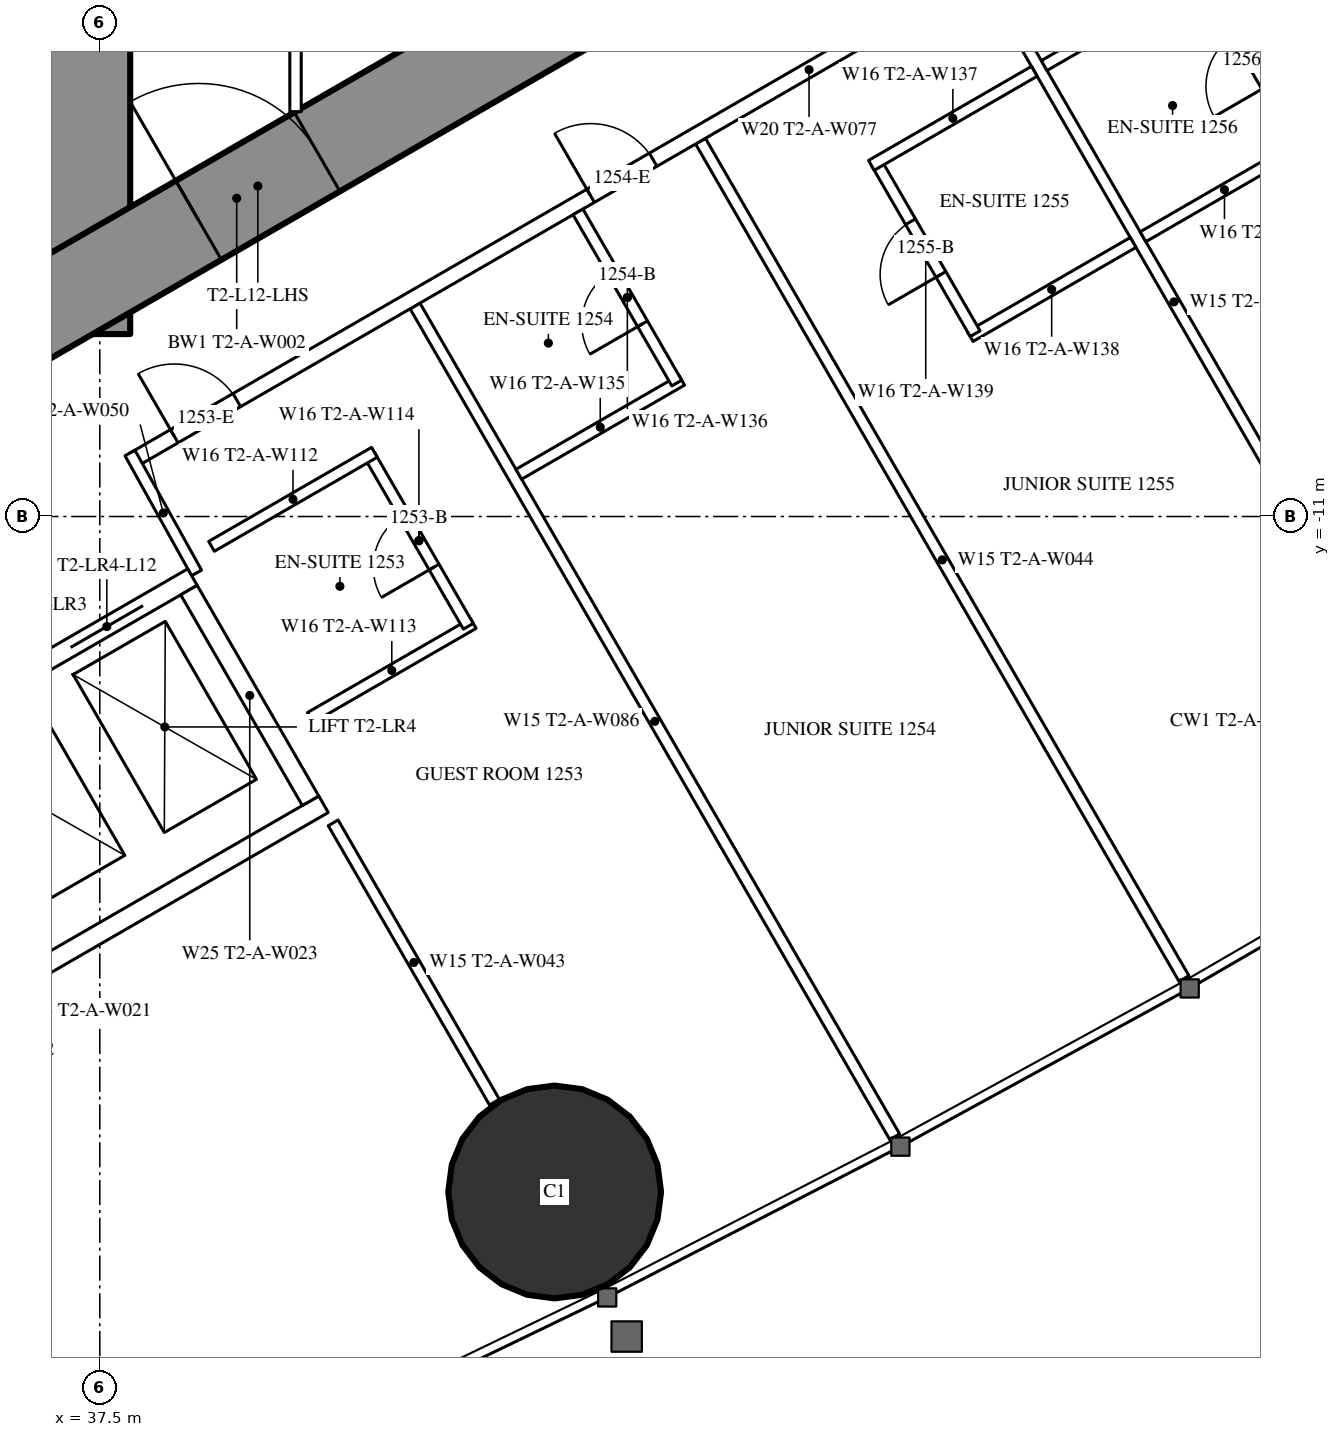
"""IFC4 building model, lengths in metres.
Left out: names, types, materials, properties, quantities, classifications, styles, units other than length and angle.
Written with IfcOpenShell. Run it as: python <this file> out.ifc"""

import sys

from ifc_helpers import new_model, si_unit, direction, frame, frame_2d, origin, origin_2d, place, context, subcontext, project, spatial, rectangle, hollow_circle, extrude, element, fill, save


model = new_model("IFC4")
c1 = context("Model", 3, precision=1e-05, world=origin(), true_north=direction((0.0, 1.0)))
c2 = subcontext(c1, "Body", "Model", "MODEL_VIEW")
j1 = project(units=[si_unit("LENGTHUNIT", "METRE"), si_unit("PLANEANGLEUNIT", "RADIAN")], contexts=[c1])
p1 = place(None, origin())
s1 = spatial("IfcSite", under=j1, at=p1, CompositionType="ELEMENT")
p2 = place(p1, origin())
s2 = spatial("IfcBuilding", under=s1, at=p2, CompositionType="ELEMENT")
p3 = place(p2, frame((0.0, 0.0, 49.5)))
s3 = spatial("IfcBuildingStorey", under=s2, at=p3, CompositionType="ELEMENT", Elevation=49.5)
p4 = place(p3, frame((43.484, -19.886, 0.0), z_axis=(0.0, 0.0, 1.0), x_axis=(1.0, 0.0, 0.0)))
e1 = element("IfcColumn", 1, at=p4, inside=s3, PredefinedType="COLUMN", context=c2, shape_type="SweptSolid", body=[
    extrude(hollow_circle(Radius=1.4, WallThickness=0.12, at=origin_2d()), origin(), (0.0, 0.0, 1.0), 3.5),
])
p5 = place(p3, frame((37.3, -8.6, 0.0), z_axis=(0.0, 0.0, 1.0), x_axis=(0.0, 1.0, 0.0)))
e2 = element("IfcWall", 2, at=p5, inside=s3, PredefinedType="SHEAR", context=c2, shape_type="SweptSolid", body=[
    extrude(rectangle(XDim=17.2, YDim=1.2, at=frame_2d((8.6, 0.0))), origin(), (0.0, 0.0, 1.0), 3.5),
])
p6 = place(p5, frame((7.7, 0.0, 0.0)))
e3 = element("IfcOpeningElement", 3, at=p6, cuts=e2, PredefinedType="OPENING", context=c2, shape_type="SweptSolid", body=[
    extrude(rectangle(XDim=1.8, YDim=2.2, at=frame_2d((0.9, 1.1))), frame((0.0, 0.61, 0.0), z_axis=(0.0, -1.0, 0.0), x_axis=(1.0, 0.0, 0.0)), (0.0, 0.0, 1.0), 1.22),
])
p7 = place(p3, frame((27.2, -13.8, 0.0), z_axis=(0.0, 0.0, 1.0), x_axis=(0.866027159892, 0.499996958321, 0.0)))
e4 = element("IfcWall", 4, at=p7, inside=s3, PredefinedType="SHEAR", context=c2, shape_type="SweptSolid", body=[
    extrude(rectangle(XDim=27.947, YDim=1.2, at=frame_2d((13.973, 0.0))), origin(), (0.0, 0.0, 1.0), 3.5),
])
p8 = place(p7, frame((4.6, 0.0, 0.0)))
e5 = element("IfcOpeningElement", 5, at=p8, cuts=e4, PredefinedType="OPENING", context=c2, shape_type="SweptSolid", body=[
    extrude(rectangle(XDim=1.0, YDim=2.2, at=frame_2d((0.5, 1.1))), frame((0.0, 0.61, 0.0), z_axis=(0.0, -1.0, 0.0), x_axis=(1.0, 0.0, 0.0)), (0.0, 0.0, 1.0), 1.22),
])
p9 = place(p7, frame((13.395, 0.0, 0.0)))
e6 = element("IfcOpeningElement", 6, at=p9, cuts=e4, PredefinedType="OPENING", context=c2, shape_type="SweptSolid", body=[
    extrude(rectangle(XDim=1.8, YDim=2.2, at=frame_2d((0.9, 1.1))), frame((0.0, 0.61, 0.0), z_axis=(0.0, -1.0, 0.0), x_axis=(1.0, 0.0, 0.0)), (0.0, 0.0, 1.0), 1.22),
])
p10 = place(p3, frame((41.647, -8.23, 0.0), z_axis=(0.0, 0.0, 1.0), x_axis=(0.49998590462, -0.866033541603, 0.0)))
e7 = element("IfcWall", 7, at=p10, inside=s3, PredefinedType="PARTITIONING", context=c2, shape_type="SweptSolid", body=[
    extrude(rectangle(XDim=12.621, YDim=0.15, at=frame_2d((6.311, 0.0))), origin(), (0.0, 0.0, 1.0), 3.25),
])
p11 = place(p3, frame((45.403, -6.062, 0.0), z_axis=(0.0, 0.0, 1.0), x_axis=(0.500007077968, -0.866021317279, 0.0)))
e8 = element("IfcWall", 8, at=p11, inside=s3, PredefinedType="PARTITIONING", context=c2, shape_type="SweptSolid", body=[
    extrude(rectangle(XDim=12.721, YDim=0.15, at=frame_2d((6.361, 0.0))), origin(), (0.0, 0.0, 1.0), 3.25),
])
p12 = place(p3, frame((49.159, -3.893, 0.0), z_axis=(0.0, 0.0, 1.0), x_axis=(0.499998773722, -0.866026111775, 0.0)))
e9 = element("IfcWall", 9, at=p12, inside=s3, PredefinedType="PARTITIONING", context=c2, shape_type="SweptSolid", body=[
    extrude(rectangle(XDim=9.892, YDim=0.15, at=frame_2d((4.946, 0.0))), origin(), (0.0, 0.0, 1.0), 2.25),
])
p13 = place(p3, frame((40.57, -15.03, 0.0), z_axis=(0.0, 0.0, 1.0), x_axis=(0.500012993597, -0.866017901798, 0.0)))
e10 = element("IfcWall", 10, at=p13, inside=s3, PredefinedType="PARTITIONING", context=c2, shape_type="SweptSolid", body=[
    extrude(rectangle(XDim=4.243, YDim=0.15, at=frame_2d((2.122, 0.0))), origin(), (0.0, 0.0, 1.0), 3.25),
])
p14 = place(p3, frame((37.96, -10.243, 0.0), z_axis=(0.0, 0.0, 1.0), x_axis=(0.866026429433, 0.499998223521, 0.0)))
e11 = element("IfcWall", 11, at=p14, inside=s3, PredefinedType="PARTITIONING", context=c2, shape_type="SweptSolid", body=[
    extrude(rectangle(XDim=20.487, YDim=0.2, at=frame_2d((10.243, 0.0))), origin(), (0.0, 0.0, 1.0), 3.25),
])
p15 = place(p14, frame((6.925, 0.0, 0.0)))
e12 = element("IfcOpeningElement", 12, at=p15, cuts=e11, PredefinedType="OPENING", context=c2, shape_type="SweptSolid", body=[
    extrude(rectangle(XDim=0.95, YDim=2.2, at=frame_2d((0.475, 1.1))), frame((0.0, 0.11, 0.0), z_axis=(0.0, -1.0, 0.0), x_axis=(1.0, 0.0, 0.0)), (0.0, 0.0, 1.0), 0.22),
])
p16 = place(p14, frame((11.549, 0.0, 0.0)))
e13 = element("IfcOpeningElement", 13, at=p16, cuts=e11, PredefinedType="OPENING", context=c2, shape_type="SweptSolid", body=[
    extrude(rectangle(XDim=0.95, YDim=2.2, at=frame_2d((0.475, 1.1))), frame((0.0, 0.11, 0.0), z_axis=(0.0, -1.0, 0.0), x_axis=(1.0, 0.0, 0.0)), (0.0, 0.0, 1.0), 0.22),
])
p17 = place(p14, frame((13.249, 0.0, 0.0)))
e14 = element("IfcOpeningElement", 14, at=p17, cuts=e11, PredefinedType="OPENING", context=c2, shape_type="SweptSolid", body=[
    extrude(rectangle(XDim=0.95, YDim=2.2, at=frame_2d((0.475, 1.1))), frame((0.0, 0.11, 0.0), z_axis=(0.0, -1.0, 0.0), x_axis=(1.0, 0.0, 0.0)), (0.0, 0.0, 1.0), 0.22),
])
p18 = place(p14, frame((17.585, 0.0, 0.0)))
e15 = element("IfcOpeningElement", 15, at=p18, cuts=e11, PredefinedType="OPENING", context=c2, shape_type="SweptSolid", body=[
    extrude(rectangle(XDim=0.95, YDim=2.2, at=frame_2d((0.475, 1.1))), frame((0.0, 0.11, 0.0), z_axis=(0.0, -1.0, 0.0), x_axis=(1.0, 0.0, 0.0)), (0.0, 0.0, 1.0), 0.22),
])
p19 = place(p14, frame((0.6, 0.0, 0.0)))
e16 = element("IfcOpeningElement", 16, at=p19, cuts=e11, PredefinedType="OPENING", context=c2, shape_type="SweptSolid", body=[
    extrude(rectangle(XDim=0.95, YDim=2.2, at=frame_2d((0.475, 1.1))), frame((0.0, 0.11, 0.0), z_axis=(0.0, -1.0, 0.0), x_axis=(1.0, 0.0, 0.0)), (0.0, 0.0, 1.0), 0.22),
])
p20 = place(p3, frame((38.773, -11.742, 0.0), z_axis=(0.0, 0.0, 1.0), x_axis=(-0.485528096672, 0.8742210632, 0.0)))
e17 = element("IfcWall", 17, at=p20, inside=s3, PredefinedType="PARTITIONING", context=c2, shape_type="SweptSolid", body=[
    extrude(rectangle(XDim=1.805, YDim=0.15, at=frame_2d((0.903, 0.0))), origin(), (0.0, 0.0, 1.0), 3.25),
])
p21 = place(p3, frame((43.012, -10.444, 0.0), z_axis=(0.0, 0.0, 1.0), x_axis=(0.866031185235, 0.4999899861, 0.0)))
e18 = element("IfcWall", 18, at=p21, inside=s3, PredefinedType="PARTITIONING", context=c2, shape_type="SweptSolid", body=[
    extrude(rectangle(XDim=2.475, YDim=0.15, at=frame_2d((1.238, 0.0))), origin(), (0.0, 0.0, 1.0), 3.25),
])
p22 = place(p3, frame((43.791, -6.993, 0.0), z_axis=(0.0, 0.0, 1.0), x_axis=(0.500047596559, -0.865997922154, 0.0)))
e19 = element("IfcWall", 19, at=p22, inside=s3, PredefinedType="PARTITIONING", context=c2, shape_type="SweptSolid", body=[
    extrude(rectangle(XDim=2.6, YDim=0.15, at=frame_2d((1.3, 0.0))), origin(), (0.0, 0.0, 1.0), 3.25),
])
p23 = place(p22, frame((0.9, 0.0, 0.0)))
e20 = element("IfcOpeningElement", 20, at=p23, cuts=e19, PredefinedType="OPENING", context=c2, shape_type="SweptSolid", body=[
    extrude(rectangle(XDim=0.8, YDim=2.2, at=frame_2d((0.4, 1.1))), frame((0.0, 0.085, 0.0), z_axis=(0.0, -1.0, 0.0), x_axis=(1.0, 0.0, 0.0)), (0.0, 0.0, 1.0), 0.17),
])
p24 = place(p3, frame((48.951, -8.632, 0.0), z_axis=(0.0, 0.0, 1.0), x_axis=(0.866006523861, 0.500032699561, 0.0)))
e21 = element("IfcWall", 21, at=p24, inside=s3, PredefinedType="PARTITIONING", context=c2, shape_type="SweptSolid", body=[
    extrude(rectangle(XDim=2.475, YDim=0.15, at=frame_2d((1.237, 0.0))), origin(), (0.0, 0.0, 1.0), 3.25),
])
p25 = place(p3, frame((47.716, -6.343, 0.0), z_axis=(0.0, 0.0, 1.0), x_axis=(0.500006934395, -0.866021400173, 0.0)))
e22 = element("IfcWall", 22, at=p25, inside=s3, PredefinedType="PARTITIONING", context=c2, shape_type="SweptSolid", body=[
    extrude(rectangle(XDim=2.6, YDim=0.15, at=frame_2d((1.3, 0.0))), origin(), (0.0, 0.0, 1.0), 3.25),
])
p26 = place(p25, frame((0.9, 0.0, 0.0)))
e23 = element("IfcOpeningElement", 23, at=p26, cuts=e22, PredefinedType="OPENING", context=c2, shape_type="SweptSolid", body=[
    extrude(rectangle(XDim=0.8, YDim=2.2, at=frame_2d((0.4, 1.1))), frame((0.0, 0.085, 0.0), z_axis=(0.0, -1.0, 0.0), x_axis=(1.0, 0.0, 0.0)), (0.0, 0.0, 1.0), 0.17),
])
for number, where, z_axis, x_axis in (
    (24, (47.651, -6.38, 0.0), (0.0, 0.0, 1.0), (0.866, 0.5, 0.0)),
    (25, (51.224, -7.32, 0.0), (0.0, 0.0, 1.0), (0.866, 0.5, 0.0)),
):
    element("IfcWall", number, at=place(p3, frame(where, z_axis=z_axis, x_axis=x_axis)), inside=s3, PredefinedType="PARTITIONING", context=c2, shape_type="SweptSolid", body=[
        extrude(rectangle(XDim=2.475, YDim=0.15, at=frame_2d((1.238, 0.0))), origin(), (0.0, 0.0, 1.0), 3.25),
    ])
p27 = place(p3, frame((52.003, -3.868, 0.0), z_axis=(0.0, 0.0, 1.0), x_axis=(0.500047596559, -0.865997922154, 0.0)))
e26 = element("IfcWall", 26, at=p27, inside=s3, PredefinedType="PARTITIONING", context=c2, shape_type="SweptSolid", body=[
    extrude(rectangle(XDim=2.6, YDim=0.15, at=frame_2d((1.3, 0.0))), origin(), (0.0, 0.0, 1.0), 3.25),
])
p28 = place(p27, frame((0.9, 0.0, 0.0)))
e27 = element("IfcOpeningElement", 27, at=p28, cuts=e26, PredefinedType="OPENING", context=c2, shape_type="SweptSolid", body=[
    extrude(rectangle(XDim=0.8, YDim=2.2, at=frame_2d((0.4, 1.1))), frame((0.0, 0.085, 0.0), z_axis=(0.0, -1.0, 0.0), x_axis=(1.0, 0.0, 0.0)), (0.0, 0.0, 1.0), 0.17),
])
p29 = place(p3, frame((49.925, -5.068, 0.0), z_axis=(0.0, 0.0, 1.0), x_axis=(0.866006523861, 0.500032699561, 0.0)))
e28 = element("IfcWall", 28, at=p29, inside=s3, PredefinedType="PARTITIONING", context=c2, shape_type="SweptSolid", body=[
    extrude(rectangle(XDim=2.475, YDim=0.15, at=frame_2d((1.237, 0.0))), origin(), (0.0, 0.0, 1.0), 3.25),
])
p30 = place(p3, frame((40.27, -13.644, 0.0), z_axis=(0.0, 0.0, 1.0), x_axis=(0.866031185235, 0.4999899861, 0.0)))
e29 = element("IfcWall", 29, at=p30, inside=s3, PredefinedType="PARTITIONING", context=c2, shape_type="SweptSolid", body=[
    extrude(rectangle(XDim=2.475, YDim=0.15, at=frame_2d((1.238, 0.0))), origin(), (0.0, 0.0, 1.0), 3.25),
])
p31 = place(p3, frame((41.048, -10.193, 0.0), z_axis=(0.0, 0.0, 1.0), x_axis=(0.500047596559, -0.865997922154, 0.0)))
e30 = element("IfcWall", 30, at=p31, inside=s3, PredefinedType="PARTITIONING", context=c2, shape_type="SweptSolid", body=[
    extrude(rectangle(XDim=2.6, YDim=0.15, at=frame_2d((1.3, 0.0))), origin(), (0.0, 0.0, 1.0), 3.25),
])
p32 = place(p31, frame((0.9, 0.0, 0.0)))
e31 = element("IfcOpeningElement", 31, at=p32, cuts=e30, PredefinedType="OPENING", context=c2, shape_type="SweptSolid", body=[
    extrude(rectangle(XDim=0.8, YDim=2.2, at=frame_2d((0.4, 1.1))), frame((0.0, 0.085, 0.0), z_axis=(0.0, -1.0, 0.0), x_axis=(1.0, 0.0, 0.0)), (0.0, 0.0, 1.0), 0.17),
])
p33 = place(p3, frame((38.97, -11.393, 0.0), z_axis=(0.0, 0.0, 1.0), x_axis=(0.866031185235, 0.4999899861, 0.0)))
e32 = element("IfcWall", 32, at=p33, inside=s3, PredefinedType="PARTITIONING", context=c2, shape_type="SweptSolid", body=[
    extrude(rectangle(XDim=2.475, YDim=0.15, at=frame_2d((1.238, 0.0))), origin(), (0.0, 0.0, 1.0), 3.25),
])
p34 = place(p3, frame((40.075, -5.674, 0.0), z_axis=(0.0, 0.0, 1.0), x_axis=(0.0, 1.0, 0.0)))
e33 = element("IfcWall", 33, at=p34, inside=s3, PredefinedType="PARTITIONING", context=c2, shape_type="SweptSolid", body=[
    extrude(rectangle(XDim=6.874, YDim=0.15, at=frame_2d((3.437, 0.0))), origin(), (0.0, 0.0, 1.0), 3.25),
])
p35 = place(p34, frame((2.537, 0.0, 0.0)))
e34 = element("IfcOpeningElement", 34, at=p35, cuts=e33, PredefinedType="OPENING", context=c2, shape_type="SweptSolid", body=[
    extrude(rectangle(XDim=1.8, YDim=2.2, at=frame_2d((0.9, 1.1))), frame((0.0, 0.085, 0.0), z_axis=(0.0, -1.0, 0.0), x_axis=(1.0, 0.0, 0.0)), (0.0, 0.0, 1.0), 0.17),
])
p36 = place(p3, frame((31.271, -16.097, 0.0), z_axis=(0.0, 0.0, 1.0), x_axis=(0.86604045752, 0.499973925258, 0.0)))
e35 = element("IfcWall", 35, at=p36, inside=s3, PredefinedType="PARTITIONING", context=c2, shape_type="SweptSolid", body=[
    extrude(rectangle(XDim=8.6, YDim=0.25, at=frame_2d((4.3, 0.0))), origin(), (0.0, 0.0, 1.0), 3.25),
])
p37 = place(p36, frame((0.75, 0.0, 0.0)))
e36 = element("IfcOpeningElement", 36, at=p37, cuts=e35, PredefinedType="OPENING", context=c2, shape_type="SweptSolid", body=[
    extrude(rectangle(XDim=1.1, YDim=2.2, at=frame_2d((0.55, 1.1))), frame((0.0, 0.135, 0.0), z_axis=(0.0, -1.0, 0.0), x_axis=(1.0, 0.0, 0.0)), (0.0, 0.0, 1.0), 0.27),
])
p38 = place(p36, frame((2.75, 0.0, 0.0)))
e37 = element("IfcOpeningElement", 37, at=p38, cuts=e35, PredefinedType="OPENING", context=c2, shape_type="SweptSolid", body=[
    extrude(rectangle(XDim=1.1, YDim=2.2, at=frame_2d((0.55, 1.1))), frame((0.0, 0.135, 0.0), z_axis=(0.0, -1.0, 0.0), x_axis=(1.0, 0.0, 0.0)), (0.0, 0.0, 1.0), 0.27),
])
p39 = place(p36, frame((4.75, 0.0, 0.0)))
e38 = element("IfcOpeningElement", 38, at=p39, cuts=e35, PredefinedType="OPENING", context=c2, shape_type="SweptSolid", body=[
    extrude(rectangle(XDim=1.1, YDim=2.2, at=frame_2d((0.55, 1.1))), frame((0.0, 0.135, 0.0), z_axis=(0.0, -1.0, 0.0), x_axis=(1.0, 0.0, 0.0)), (0.0, 0.0, 1.0), 0.27),
])
p40 = place(p36, frame((6.75, 0.0, 0.0)))
e39 = element("IfcOpeningElement", 39, at=p40, cuts=e35, PredefinedType="OPENING", context=c2, shape_type="SweptSolid", body=[
    extrude(rectangle(XDim=1.1, YDim=2.2, at=frame_2d((0.55, 1.1))), frame((0.0, 0.135, 0.0), z_axis=(0.0, -1.0, 0.0), x_axis=(1.0, 0.0, 0.0)), (0.0, 0.0, 1.0), 0.27),
])
p41 = place(p3, frame((32.996, -19.086, 0.0), z_axis=(0.0, 0.0, 1.0), x_axis=(0.866028165386, 0.499995216735, 0.0)))
e40 = element("IfcWall", 40, at=p41, inside=s3, PredefinedType="PARTITIONING", context=c2, shape_type="SweptSolid", body=[
    extrude(rectangle(XDim=8.6, YDim=0.25, at=frame_2d((4.3, 0.0))), origin(), (0.0, 0.0, 1.0), 3.25),
])
p42 = place(p3, frame((38.673, -11.968, 0.0), z_axis=(0.0, 0.0, 1.0), x_axis=(0.499929347863, -0.866066190972, 0.0)))
e41 = element("IfcWall", 41, at=p42, inside=s3, PredefinedType="PARTITIONING", context=c2, shape_type="SweptSolid", body=[
    extrude(rectangle(XDim=3.201, YDim=0.25, at=frame_2d((1.6, 0.0))), origin(), (0.0, 0.0, 1.0), 3.25),
])
p43 = place(p23, origin())
e42 = element("IfcDoor", 42, at=p43, inside=s3, OperationType="SINGLE_SWING_RIGHT", PredefinedType="DOOR", context=c2, shape_type="SweptSolid", body=[
    extrude(rectangle(XDim=0.8, YDim=2.2, at=frame_2d((0.4, 1.1))), frame((0.0, 0.025, 0.0), z_axis=(0.0, -1.0, 0.0), x_axis=(1.0, 0.0, 0.0)), (0.0, 0.0, 1.0), 0.05),
])
fill(e20, e42)
p44 = place(p15, origin())
e43 = element("IfcDoor", 43, at=p44, inside=s3, OperationType="SINGLE_SWING_LEFT", PredefinedType="DOOR", context=c2, shape_type="SweptSolid", body=[
    extrude(rectangle(XDim=0.95, YDim=2.2, at=frame_2d((0.475, 1.1))), frame((0.0, 0.025, 0.0), z_axis=(0.0, -1.0, 0.0), x_axis=(1.0, 0.0, 0.0)), (0.0, 0.0, 1.0), 0.05),
])
fill(e12, e43)
p45 = place(p26, origin())
e44 = element("IfcDoor", 44, at=p45, inside=s3, OperationType="SINGLE_SWING_RIGHT", PredefinedType="DOOR", context=c2, shape_type="SweptSolid", body=[
    extrude(rectangle(XDim=0.8, YDim=2.2, at=frame_2d((0.4, 1.1))), frame((0.0, 0.025, 0.0), z_axis=(0.0, -1.0, 0.0), x_axis=(1.0, 0.0, 0.0)), (0.0, 0.0, 1.0), 0.05),
])
fill(e23, e44)
p46 = place(p28, origin())
e45 = element("IfcDoor", 45, at=p46, inside=s3, OperationType="SINGLE_SWING_RIGHT", PredefinedType="DOOR", context=c2, shape_type="SweptSolid", body=[
    extrude(rectangle(XDim=0.8, YDim=2.2, at=frame_2d((0.4, 1.1))), frame((0.0, 0.025, 0.0), z_axis=(0.0, -1.0, 0.0), x_axis=(1.0, 0.0, 0.0)), (0.0, 0.0, 1.0), 0.05),
])
fill(e27, e45)
p47 = place(p32, origin())
e46 = element("IfcDoor", 46, at=p47, inside=s3, OperationType="SINGLE_SWING_RIGHT", PredefinedType="DOOR", context=c2, shape_type="SweptSolid", body=[
    extrude(rectangle(XDim=0.8, YDim=2.2, at=frame_2d((0.4, 1.1))), frame((0.0, 0.025, 0.0), z_axis=(0.0, -1.0, 0.0), x_axis=(1.0, 0.0, 0.0)), (0.0, 0.0, 1.0), 0.05),
])
fill(e31, e46)
p48 = place(p19, origin())
e47 = element("IfcDoor", 47, at=p48, inside=s3, OperationType="SINGLE_SWING_LEFT", PredefinedType="DOOR", context=c2, shape_type="SweptSolid", body=[
    extrude(rectangle(XDim=0.95, YDim=2.2, at=frame_2d((0.475, 1.1))), frame((0.0, 0.025, 0.0), z_axis=(0.0, -1.0, 0.0), x_axis=(1.0, 0.0, 0.0)), (0.0, 0.0, 1.0), 0.05),
])
fill(e16, e47)
p49 = place(p9, origin())
e48 = element("IfcDoor", 48, at=p49, inside=s3, OperationType="DOUBLE_DOOR_SINGLE_SWING", PredefinedType="DOOR", context=c2, shape_type="SweptSolid", body=[
    extrude(rectangle(XDim=1.8, YDim=2.2, at=frame_2d((0.9, 1.1))), frame((0.0, 0.025, 0.0), z_axis=(0.0, -1.0, 0.0), x_axis=(1.0, 0.0, 0.0)), (0.0, 0.0, 1.0), 0.05),
])
fill(e6, e48)
p50 = place(p40, origin())
e49 = element("IfcDoor", 49, at=p50, inside=s3, OperationType="DOUBLE_DOOR_SLIDING", PredefinedType="USERDEFINED", context=c2, shape_type="SweptSolid", body=[
    extrude(rectangle(XDim=1.1, YDim=2.2, at=frame_2d((0.55, 1.1))), frame((0.0, 0.025, 0.0), z_axis=(0.0, -1.0, 0.0), x_axis=(1.0, 0.0, 0.0)), (0.0, 0.0, 1.0), 0.05),
])
fill(e39, e49)
save(model, sys.argv[1])
